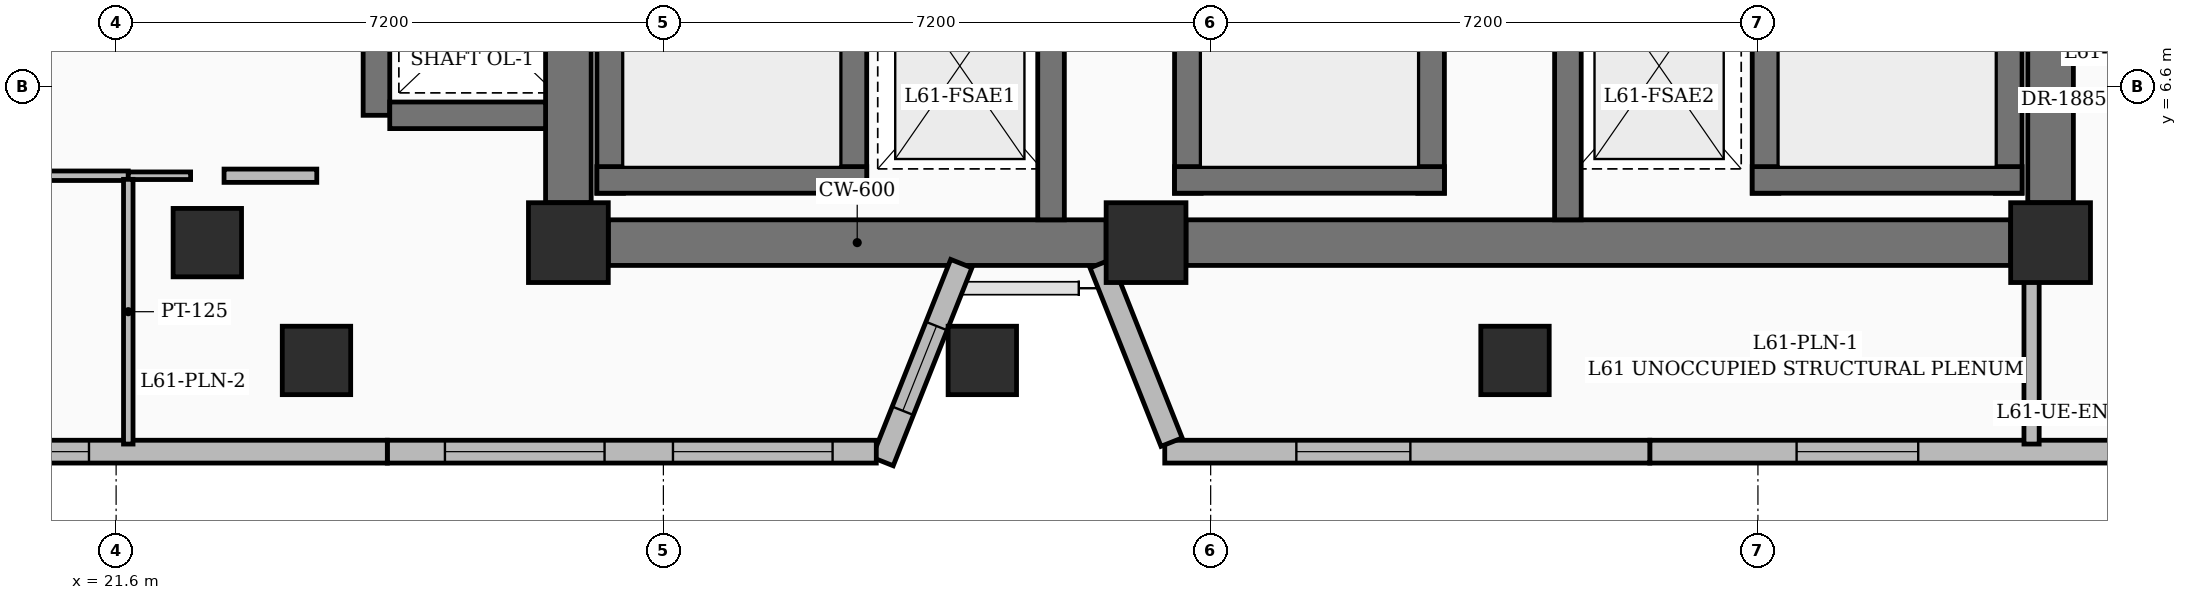
"""IFC4 building model, lengths in metres.
Left out: names, types, materials, properties, quantities, classifications, styles, units other than length and angle.
Written with IfcOpenShell. Run it as: python <this file> out.ifc"""

import sys

from ifc_helpers import new_model, si_unit, direction, frame, frame_2d, origin, origin_2d, place, context, subcontext, project, spatial, rectangle, extrude, element, fill, save


model = new_model("IFC4")
c1 = context("Model", 3, precision=1e-05, world=origin(), true_north=direction((0.0, 1.0)))
c2 = subcontext(c1, "Body", "Model", "MODEL_VIEW")
j1 = project(units=[si_unit("LENGTHUNIT", "METRE"), si_unit("PLANEANGLEUNIT", "RADIAN")], contexts=[c1])
p1 = place(None, origin())
s1 = spatial("IfcSite", under=j1, at=p1, CompositionType="ELEMENT")
p2 = place(p1, origin())
s2 = spatial("IfcBuilding", under=s1, at=p2, CompositionType="ELEMENT")
p3 = place(p2, frame((0.0, 0.0, 237.0)))
s3 = spatial("IfcBuildingStorey", under=s2, at=p3, CompositionType="ELEMENT", Elevation=237.0)
for number, where, z_axis, x_axis in (
    (1, (27.55, 4.55, 0.0), (0.0, 0.0, 1.0), (1.0, 0.0, 0.0)),
    (2, (35.15, 4.55, 0.0), (0.0, 0.0, 1.0), (1.0, 0.0, 0.0)),
    (3, (47.05, 4.55, 0.0), (0.0, 0.0, 1.0), (1.0, 0.0, 0.0)),
):
    element("IfcColumn", number, at=place(p3, frame(where, z_axis=z_axis, x_axis=x_axis)), inside=s3, PredefinedType="COLUMN", context=c2, shape_type="SweptSolid", body=[
        extrude(rectangle(XDim=1.05, YDim=1.05, at=origin_2d()), origin(), (0.0, 0.0, 1.0), 3.75),
    ])
p4 = place(p3, frame((22.8, 4.55, 0.0), z_axis=(0.0, 0.0, 1.0), x_axis=(1.0, 0.0, 0.0)))
e4 = element("IfcColumn", 4, at=p4, inside=s3, PredefinedType="COLUMN", context=c2, shape_type="SweptSolid", body=[
    extrude(rectangle(XDim=0.9, YDim=0.9, at=origin_2d()), origin(), (0.0, 0.0, 1.0), 3.75),
])
p5 = place(p3, frame((28.075, 4.55, 0.0), z_axis=(0.0, 0.0, 1.0), x_axis=(1.0, 0.0, 0.0)))
e5 = element("IfcWall", 5, at=p5, inside=s3, PredefinedType="SHEAR", context=c2, shape_type="SweptSolid", body=[
    extrude(rectangle(XDim=6.55, YDim=0.6, at=frame_2d((3.275, 0.0))), origin(), (0.0, 0.0, 1.0), 3.75),
])
p6 = place(p3, frame((35.675, 4.55, 0.0), z_axis=(0.0, 0.0, 1.0), x_axis=(1.0, 0.0, 0.0)))
e6 = element("IfcWall", 6, at=p6, inside=s3, PredefinedType="SHEAR", context=c2, shape_type="SweptSolid", body=[
    extrude(rectangle(XDim=10.85, YDim=0.6, at=frame_2d((5.425, 0.0))), origin(), (0.0, 0.0, 1.0), 3.75),
])
for number, where, z_axis, x_axis in (
    (7, (27.55, 5.075, 0.0), (0.0, 0.0, 1.0), (0.0, 1.0, 0.0)),
    (8, (47.05, 5.075, 0.0), (0.0, 0.0, 1.0), (0.0, 1.0, 0.0)),
):
    element("IfcWall", number, at=place(p3, frame(where, z_axis=z_axis, x_axis=x_axis)), inside=s3, PredefinedType="SHEAR", context=c2, shape_type="SweptSolid", body=[
        extrude(rectangle(XDim=9.15, YDim=0.6, at=frame_2d((4.575, 0.0))), origin(), (0.0, 0.0, 1.0), 3.75),
    ])
p7 = place(p3, frame((28.1, 5.2, 0.0), z_axis=(0.0, 0.0, 1.0), x_axis=(0.0, 1.0, 0.0)))
e9 = element("IfcWall", 9, at=p7, inside=s3, PredefinedType="SOLIDWALL", context=c2, shape_type="SweptSolid", body=[
    extrude(rectangle(XDim=9.25, YDim=0.35, at=frame_2d((4.625, 0.0))), origin(), (0.0, 0.0, 1.0), 3.75),
])
p8 = place(p3, frame((31.3, 5.2, 0.0), z_axis=(0.0, 0.0, 1.0), x_axis=(0.0, 1.0, 0.0)))
e10 = element("IfcWall", 10, at=p8, inside=s3, PredefinedType="SOLIDWALL", context=c2, shape_type="SweptSolid", body=[
    extrude(rectangle(XDim=9.25, YDim=0.35, at=frame_2d((4.625, 0.0))), origin(), (0.0, 0.0, 1.0), 3.75),
])
p9 = place(p8, frame((6.02, 0.0, 0.0)))
e11 = element("IfcOpeningElement", 11, at=p9, cuts=e10, PredefinedType="OPENING", context=c2, shape_type="SweptSolid", body=[
    extrude(rectangle(XDim=1.0, YDim=2.15, at=frame_2d((0.5, 1.075))), frame((0.0, 0.185, 0.0), z_axis=(0.0, -1.0, 0.0), x_axis=(1.0, 0.0, 0.0)), (0.0, 0.0, 1.0), 0.37),
])
p10 = place(p3, frame((27.925, 5.375, 0.0), z_axis=(0.0, 0.0, 1.0), x_axis=(1.0, 0.0, 0.0)))
e12 = element("IfcWall", 12, at=p10, inside=s3, PredefinedType="SOLIDWALL", context=c2, shape_type="SweptSolid", body=[
    extrude(rectangle(XDim=3.55, YDim=0.35, at=frame_2d((1.775, 0.0))), origin(), (0.0, 0.0, 1.0), 3.75),
])
p11 = place(p3, frame((35.7, 5.2, 0.0), z_axis=(0.0, 0.0, 1.0), x_axis=(0.0, 1.0, 0.0)))
e13 = element("IfcWall", 13, at=p11, inside=s3, PredefinedType="SOLIDWALL", context=c2, shape_type="SweptSolid", body=[
    extrude(rectangle(XDim=9.25, YDim=0.35, at=frame_2d((4.625, 0.0))), origin(), (0.0, 0.0, 1.0), 3.75),
])
p12 = place(p11, frame((6.02, 0.0, 0.0)))
e14 = element("IfcOpeningElement", 14, at=p12, cuts=e13, PredefinedType="OPENING", context=c2, shape_type="SweptSolid", body=[
    extrude(rectangle(XDim=1.0, YDim=2.15, at=frame_2d((0.5, 1.075))), frame((0.0, 0.185, 0.0), z_axis=(0.0, -1.0, 0.0), x_axis=(1.0, 0.0, 0.0)), (0.0, 0.0, 1.0), 0.37),
])
p13 = place(p3, frame((38.9, 5.2, 0.0), z_axis=(0.0, 0.0, 1.0), x_axis=(0.0, 1.0, 0.0)))
e15 = element("IfcWall", 15, at=p13, inside=s3, PredefinedType="SOLIDWALL", context=c2, shape_type="SweptSolid", body=[
    extrude(rectangle(XDim=9.25, YDim=0.35, at=frame_2d((4.625, 0.0))), origin(), (0.0, 0.0, 1.0), 3.75),
])
p14 = place(p13, frame((6.02, 0.0, 0.0)))
e16 = element("IfcOpeningElement", 16, at=p14, cuts=e15, PredefinedType="OPENING", context=c2, shape_type="SweptSolid", body=[
    extrude(rectangle(XDim=1.0, YDim=2.15, at=frame_2d((0.5, 1.075))), frame((0.0, 0.185, 0.0), z_axis=(0.0, -1.0, 0.0), x_axis=(1.0, 0.0, 0.0)), (0.0, 0.0, 1.0), 0.37),
])
p15 = place(p3, frame((35.525, 5.375, 0.0), z_axis=(0.0, 0.0, 1.0), x_axis=(1.0, 0.0, 0.0)))
e17 = element("IfcWall", 17, at=p15, inside=s3, PredefinedType="SOLIDWALL", context=c2, shape_type="SweptSolid", body=[
    extrude(rectangle(XDim=3.55, YDim=0.35, at=frame_2d((1.775, 0.0))), origin(), (0.0, 0.0, 1.0), 3.75),
])
p16 = place(p3, frame((43.3, 5.2, 0.0), z_axis=(0.0, 0.0, 1.0), x_axis=(0.0, 1.0, 0.0)))
e18 = element("IfcWall", 18, at=p16, inside=s3, PredefinedType="SOLIDWALL", context=c2, shape_type="SweptSolid", body=[
    extrude(rectangle(XDim=9.25, YDim=0.35, at=frame_2d((4.625, 0.0))), origin(), (0.0, 0.0, 1.0), 3.75),
])
p17 = place(p16, frame((6.02, 0.0, 0.0)))
e19 = element("IfcOpeningElement", 19, at=p17, cuts=e18, PredefinedType="OPENING", context=c2, shape_type="SweptSolid", body=[
    extrude(rectangle(XDim=1.0, YDim=2.15, at=frame_2d((0.5, 1.075))), frame((0.0, 0.185, 0.0), z_axis=(0.0, -1.0, 0.0), x_axis=(1.0, 0.0, 0.0)), (0.0, 0.0, 1.0), 0.37),
])
p18 = place(p3, frame((46.5, 5.2, 0.0), z_axis=(0.0, 0.0, 1.0), x_axis=(0.0, 1.0, 0.0)))
e20 = element("IfcWall", 20, at=p18, inside=s3, PredefinedType="SOLIDWALL", context=c2, shape_type="SweptSolid", body=[
    extrude(rectangle(XDim=9.25, YDim=0.35, at=frame_2d((4.625, 0.0))), origin(), (0.0, 0.0, 1.0), 3.75),
])
p19 = place(p3, frame((43.125, 5.375, 0.0), z_axis=(0.0, 0.0, 1.0), x_axis=(1.0, 0.0, 0.0)))
e21 = element("IfcWall", 21, at=p19, inside=s3, PredefinedType="SOLIDWALL", context=c2, shape_type="SweptSolid", body=[
    extrude(rectangle(XDim=3.55, YDim=0.35, at=frame_2d((1.775, 0.0))), origin(), (0.0, 0.0, 1.0), 3.75),
])
for number, where, z_axis, x_axis in (
    (22, (33.9, 4.85, 0.0), (0.0, 0.0, 1.0), (0.0, 1.0, 0.0)),
    (23, (40.7, 4.85, 0.0), (0.0, 0.0, 1.0), (0.0, 1.0, 0.0)),
):
    element("IfcWall", number, at=place(p3, frame(where, z_axis=z_axis, x_axis=x_axis)), inside=s3, PredefinedType="SOLIDWALL", context=c2, shape_type="SweptSolid", body=[
        extrude(rectangle(XDim=3.075, YDim=0.35, at=frame_2d((1.538, 0.0))), origin(), (0.0, 0.0, 1.0), 3.75),
    ])
p20 = place(p3, frame((25.025, 6.225, 0.0), z_axis=(0.0, 0.0, 1.0), x_axis=(0.0, 1.0, 0.0)))
e24 = element("IfcWall", 24, at=p20, inside=s3, PredefinedType="SOLIDWALL", context=c2, shape_type="SweptSolid", body=[
    extrude(rectangle(XDim=4.95, YDim=0.35, at=frame_2d((2.475, 0.0))), origin(), (0.0, 0.0, 1.0), 3.75),
])
p21 = place(p3, frame((25.2, 6.225, 0.0), z_axis=(0.0, 0.0, 1.0), x_axis=(1.0, 0.0, 0.0)))
e25 = element("IfcWall", 25, at=p21, inside=s3, PredefinedType="SOLIDWALL", context=c2, shape_type="SweptSolid", body=[
    extrude(rectangle(XDim=2.05, YDim=0.35, at=frame_2d((1.025, 0.0))), origin(), (0.0, 0.0, 1.0), 3.75),
])
for number, where, z_axis, x_axis in (
    (26, (24.236, 3.0, 0.0), (0.0, 0.0, 1.0), (1.0, 0.0, 0.0)),
    (27, (32.996, 3.0, 0.0), (0.0, 0.0, 1.0), (1.0, 0.0, 0.0)),
    (28, (40.004, 3.0, 0.0), (0.0, 0.0, 1.0), (1.0, 0.0, 0.0)),
):
    element("IfcColumn", number, at=place(p3, frame(where, z_axis=z_axis, x_axis=x_axis)), inside=s3, PredefinedType="COLUMN", context=c2, shape_type="SweptSolid", body=[
        extrude(rectangle(XDim=0.9, YDim=0.9, at=origin_2d()), origin(), (0.0, 0.0, 1.0), 3.75),
    ])
p22 = place(p3, frame((48.159, 1.8, 0.0), z_axis=(0.0, 0.0, 1.0), x_axis=(-1.0, 0.0, 0.0)))
e29 = element("IfcWall", 29, at=p22, inside=s3, PredefinedType="SOLIDWALL", context=c2, shape_type="SweptSolid", body=[
    extrude(rectangle(XDim=6.381, YDim=0.3, at=frame_2d((3.191, 0.0))), origin(), (0.0, 0.0, 1.0), 3.5),
])
p23 = place(p22, frame((2.85, 0.0, 0.55)))
e30 = element("IfcOpeningElement", 30, at=p23, cuts=e29, PredefinedType="OPENING", context=c2, shape_type="SweptSolid", body=[
    extrude(rectangle(XDim=1.6, YDim=2.2, at=frame_2d((0.8, 1.1))), frame((0.0, 0.16, 0.0), z_axis=(0.0, -1.0, 0.0), x_axis=(1.0, 0.0, 0.0)), (0.0, 0.0, 1.0), 0.32),
])
p24 = place(p3, frame((41.777, 1.8, 0.0), z_axis=(0.0, 0.0, 1.0), x_axis=(-1.0, 0.0, 0.0)))
e31 = element("IfcWall", 31, at=p24, inside=s3, PredefinedType="SOLIDWALL", context=c2, shape_type="SweptSolid", body=[
    extrude(rectangle(XDim=6.381, YDim=0.3, at=frame_2d((3.191, 0.0))), origin(), (0.0, 0.0, 1.0), 3.5),
])
p25 = place(p24, frame((3.15, 0.0, 0.6)))
e32 = element("IfcOpeningElement", 32, at=p25, cuts=e31, PredefinedType="OPENING", context=c2, shape_type="SweptSolid", body=[
    extrude(rectangle(XDim=1.5, YDim=2.1, at=frame_2d((0.75, 1.05))), frame((0.0, 0.16, 0.0), z_axis=(0.0, -1.0, 0.0), x_axis=(1.0, 0.0, 0.0)), (0.0, 0.0, 1.0), 0.32),
])
p26 = place(p3, frame((35.486, 1.925, 0.0), z_axis=(0.0, 0.0, 1.0), x_axis=(-0.369457562636, 0.929247603931, 0.0)))
e33 = element("IfcWall", 33, at=p26, inside=s3, PredefinedType="SOLIDWALL", context=c2, shape_type="SweptSolid", body=[
    extrude(rectangle(XDim=2.527, YDim=0.3, at=frame_2d((1.263, 0.0))), origin(), (0.0, 0.0, 1.0), 2.69),
])
p27 = place(p3, frame((32.719, 4.273, 0.0), z_axis=(0.0, 0.0, 1.0), x_axis=(-0.369466825356, -0.929243921132, 0.0)))
e34 = element("IfcWall", 34, at=p27, inside=s3, PredefinedType="SOLIDWALL", context=c2, shape_type="SweptSolid", body=[
    extrude(rectangle(XDim=2.802, YDim=0.3, at=frame_2d((1.401, 0.0))), origin(), (0.0, 0.0, 1.0), 2.825),
])
p28 = place(p27, frame((0.883, 0.0, 0.8)))
e35 = element("IfcOpeningElement", 35, at=p28, cuts=e34, PredefinedType="OPENING", context=c2, shape_type="SweptSolid", body=[
    extrude(rectangle(XDim=1.2, YDim=1.8, at=frame_2d((0.6, 0.9))), frame((0.0, 0.16, 0.0), z_axis=(0.0, -1.0, 0.0), x_axis=(1.0, 0.0, 0.0)), (0.0, 0.0, 1.0), 0.32),
])
p29 = place(p3, frame((31.601, 1.8, 0.0), z_axis=(0.0, 0.0, 1.0), x_axis=(-1.0, 0.0, 0.0)))
e36 = element("IfcWall", 36, at=p29, inside=s3, PredefinedType="SOLIDWALL", context=c2, shape_type="SweptSolid", body=[
    extrude(rectangle(XDim=6.433, YDim=0.3, at=frame_2d((3.217, 0.0))), origin(), (0.0, 0.0, 1.0), 3.5),
])
p30 = place(p29, frame((0.575, 0.0, 0.55)))
e37 = element("IfcOpeningElement", 37, at=p30, cuts=e36, PredefinedType="OPENING", context=c2, shape_type="SweptSolid", body=[
    extrude(rectangle(XDim=2.1, YDim=2.4, at=frame_2d((1.05, 1.2))), frame((0.0, 0.16, 0.0), z_axis=(0.0, -1.0, 0.0), x_axis=(1.0, 0.0, 0.0)), (0.0, 0.0, 1.0), 0.32),
])
p31 = place(p29, frame((3.575, 0.0, 0.55)))
e38 = element("IfcOpeningElement", 38, at=p31, cuts=e36, PredefinedType="OPENING", context=c2, shape_type="SweptSolid", body=[
    extrude(rectangle(XDim=2.1, YDim=2.4, at=frame_2d((1.05, 1.2))), frame((0.0, 0.16, 0.0), z_axis=(0.0, -1.0, 0.0), x_axis=(1.0, 0.0, 0.0)), (0.0, 0.0, 1.0), 0.32),
])
p32 = place(p3, frame((25.168, 1.8, 0.0), z_axis=(0.0, 0.0, 1.0), x_axis=(-1.0, 0.0, 0.0)))
e39 = element("IfcWall", 39, at=p32, inside=s3, PredefinedType="SOLIDWALL", context=c2, shape_type="SweptSolid", body=[
    extrude(rectangle(XDim=6.708, YDim=0.3, at=frame_2d((3.354, 0.0))), origin(), (0.0, 0.0, 1.0), 3.5),
])
p33 = place(p32, frame((3.925, 0.0, 0.8)))
e40 = element("IfcOpeningElement", 40, at=p33, cuts=e39, PredefinedType="OPENING", context=c2, shape_type="SweptSolid", body=[
    extrude(rectangle(XDim=1.2, YDim=1.8, at=frame_2d((0.6, 0.9))), frame((0.0, 0.16, 0.0), z_axis=(0.0, -1.0, 0.0), x_axis=(1.0, 0.0, 0.0)), (0.0, 0.0, 1.0), 0.32),
])
p34 = place(p3, frame((19.41, 5.43, 0.0), z_axis=(0.0, 0.0, 1.0), x_axis=(1.0, 0.0, 0.0)))
e41 = element("IfcWall", 41, at=p34, inside=s3, PredefinedType="PARTITIONING", context=c2, shape_type="SweptSolid", body=[
    extrude(rectangle(XDim=2.35, YDim=0.125, at=frame_2d((1.175, 0.0))), origin(), (0.0, 0.0, 1.0), 3.5),
])
p35 = place(p3, frame((21.76, 5.43, 0.0), z_axis=(0.0, 0.0, 1.0), x_axis=(1.0, 0.0, 0.0)))
e42 = element("IfcWall", 42, at=p35, inside=s3, PredefinedType="PARTITIONING", context=c2, shape_type="SweptSolid", body=[
    extrude(rectangle(XDim=0.82, YDim=0.1, at=frame_2d((0.41, 0.0))), origin(), (0.0, 0.0, 1.0), 3.5),
])
p36 = place(p3, frame((23.02, 5.43, 0.0), z_axis=(0.0, 0.0, 1.0), x_axis=(1.0, 0.0, 0.0)))
e43 = element("IfcWall", 43, at=p36, inside=s3, PredefinedType="PARTITIONING", context=c2, shape_type="SweptSolid", body=[
    extrude(rectangle(XDim=1.22, YDim=0.175, at=frame_2d((0.61, 0.0))), origin(), (0.0, 0.0, 1.0), 2.82),
])
p37 = place(p3, frame((21.76, 1.9, 0.0), z_axis=(0.0, 0.0, 1.0), x_axis=(0.0, 1.0, 0.0)))
e44 = element("IfcWall", 44, at=p37, inside=s3, PredefinedType="PARTITIONING", context=c2, shape_type="SweptSolid", body=[
    extrude(rectangle(XDim=3.483, YDim=0.125, at=frame_2d((1.741, 0.0))), origin(), (0.0, 0.0, 1.0), 3.5),
])
p38 = place(p3, frame((46.8, 1.9, 0.0), z_axis=(0.0, 0.0, 1.0), x_axis=(0.0, 1.0, 0.0)))
e45 = element("IfcWall", 45, at=p38, inside=s3, PredefinedType="PARTITIONING", context=c2, shape_type="SweptSolid", body=[
    extrude(rectangle(XDim=2.35, YDim=0.2, at=frame_2d((1.175, 0.0))), origin(), (0.0, 0.0, 1.0), 2.82),
])
p39 = place(p3, frame((47.35, 6.39, 0.0), z_axis=(0.0, 0.0, 1.0), x_axis=(1.0, 0.0, 0.0)))
e46 = element("IfcWall", 46, at=p39, inside=s3, PredefinedType="PARTITIONING", context=c2, shape_type="SweptSolid", body=[
    extrude(rectangle(XDim=1.59, YDim=0.15, at=frame_2d((0.795, 0.0))), origin(), (0.0, 0.0, 1.0), 2.685),
])
p40 = place(p23, origin())
e47 = element("IfcWindow", 47, at=p40, inside=s3, PartitioningType="SINGLE_PANEL", PredefinedType="WINDOW", context=c2, shape_type="SweptSolid", body=[
    extrude(rectangle(XDim=1.6, YDim=2.2, at=frame_2d((0.8, 1.1))), frame((0.0, 0.03, 0.0), z_axis=(0.0, -1.0, 0.0), x_axis=(1.0, 0.0, 0.0)), (0.0, 0.0, 1.0), 0.06),
])
fill(e30, e47)
p41 = place(p25, origin())
e48 = element("IfcWindow", 48, at=p41, inside=s3, PartitioningType="SINGLE_PANEL", PredefinedType="WINDOW", context=c2, shape_type="SweptSolid", body=[
    extrude(rectangle(XDim=1.5, YDim=2.1, at=frame_2d((0.75, 1.05))), frame((0.0, 0.03, 0.0), z_axis=(0.0, -1.0, 0.0), x_axis=(1.0, 0.0, 0.0)), (0.0, 0.0, 1.0), 0.06),
])
fill(e32, e48)
p42 = place(p28, origin())
e49 = element("IfcWindow", 49, at=p42, inside=s3, PartitioningType="SINGLE_PANEL", PredefinedType="WINDOW", context=c2, shape_type="SweptSolid", body=[
    extrude(rectangle(XDim=1.2, YDim=1.8, at=frame_2d((0.6, 0.9))), frame((0.0, 0.03, 0.0), z_axis=(0.0, -1.0, 0.0), x_axis=(1.0, 0.0, 0.0)), (0.0, 0.0, 1.0), 0.06),
])
fill(e35, e49)
p43 = place(p30, origin())
e50 = element("IfcWindow", 50, at=p43, inside=s3, PartitioningType="SINGLE_PANEL", PredefinedType="WINDOW", context=c2, shape_type="SweptSolid", body=[
    extrude(rectangle(XDim=2.1, YDim=2.4, at=frame_2d((1.05, 1.2))), frame((0.0, 0.03, 0.0), z_axis=(0.0, -1.0, 0.0), x_axis=(1.0, 0.0, 0.0)), (0.0, 0.0, 1.0), 0.06),
])
fill(e37, e50)
p44 = place(p31, origin())
e51 = element("IfcWindow", 51, at=p44, inside=s3, PartitioningType="SINGLE_PANEL", PredefinedType="WINDOW", context=c2, shape_type="SweptSolid", body=[
    extrude(rectangle(XDim=2.1, YDim=2.4, at=frame_2d((1.05, 1.2))), frame((0.0, 0.03, 0.0), z_axis=(0.0, -1.0, 0.0), x_axis=(1.0, 0.0, 0.0)), (0.0, 0.0, 1.0), 0.06),
])
fill(e38, e51)
p45 = place(p33, origin())
e52 = element("IfcWindow", 52, at=p45, inside=s3, PartitioningType="SINGLE_PANEL", PredefinedType="WINDOW", context=c2, shape_type="SweptSolid", body=[
    extrude(rectangle(XDim=1.2, YDim=1.8, at=frame_2d((0.6, 0.9))), frame((0.0, 0.03, 0.0), z_axis=(0.0, -1.0, 0.0), x_axis=(1.0, 0.0, 0.0)), (0.0, 0.0, 1.0), 0.06),
])
fill(e40, e52)
save(model, sys.argv[1])
